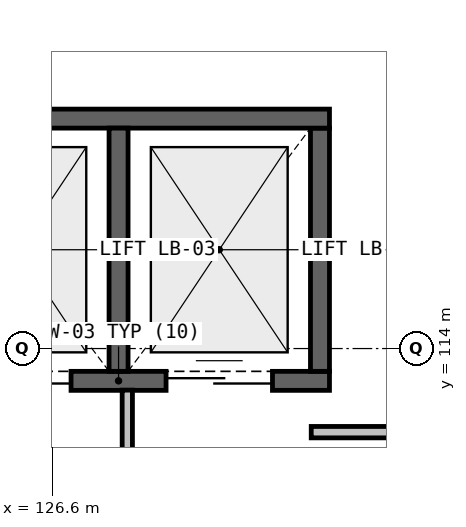
"""IFC4 building model, lengths in metres.
Left out: names, types, materials, properties, quantities, classifications, styles, units other than length and angle.
Written with IfcOpenShell. Run it as: python <this file> out.ifc"""

import sys

from ifc_helpers import new_model, si_unit, direction, frame, frame_2d, origin, place, context, subcontext, project, spatial, rectangle, extrude, element, fill, save


model = new_model("IFC4")
c1 = context("Model", 3, precision=1e-05, world=origin(), true_north=direction((0.0, 1.0)))
c2 = subcontext(c1, "Body", "Model", "MODEL_VIEW")
j1 = project(units=[si_unit("LENGTHUNIT", "METRE"), si_unit("PLANEANGLEUNIT", "RADIAN")], contexts=[c1])
p1 = place(None, origin())
s1 = spatial("IfcSite", under=j1, at=p1, CompositionType="ELEMENT")
p2 = place(p1, origin())
s2 = spatial("IfcBuilding", under=s1, at=p2, CompositionType="ELEMENT")
p3 = place(p2, frame((0.0, 0.0, 19.2)))
s3 = spatial("IfcBuildingStorey", under=s2, at=p3, CompositionType="ELEMENT", Elevation=19.2)
p4 = place(p3, frame((124.7, 113.575, 0.0), z_axis=(0.0, 0.0, 1.0), x_axis=(1.0, 0.0, 0.0)))
e1 = element("IfcWall", 1, at=p4, inside=s3, PredefinedType="SHEAR", context=c2, shape_type="SweptSolid", body=[
    extrude(rectangle(XDim=5.55, YDim=0.25, at=frame_2d((2.775, 0.0))), origin(), (0.0, 0.0, 1.0), 3.77),
])
p5 = place(p4, frame((0.75, 0.0, 0.0)))
e2 = element("IfcOpeningElement", 2, at=p5, cuts=e1, PredefinedType="OPENING", context=c2, shape_type="SweptSolid", body=[
    extrude(rectangle(XDim=1.4, YDim=2.2, at=frame_2d((0.7, 1.1))), frame((0.0, 0.135, 0.0), z_axis=(0.0, -1.0, 0.0), x_axis=(1.0, 0.0, 0.0)), (0.0, 0.0, 1.0), 0.27),
])
p6 = place(p4, frame((3.4, 0.0, 0.0)))
e3 = element("IfcOpeningElement", 3, at=p6, cuts=e1, PredefinedType="OPENING", context=c2, shape_type="SweptSolid", body=[
    extrude(rectangle(XDim=1.4, YDim=2.2, at=frame_2d((0.7, 1.1))), frame((0.0, 0.135, 0.0), z_axis=(0.0, -1.0, 0.0), x_axis=(1.0, 0.0, 0.0)), (0.0, 0.0, 1.0), 0.27),
])
p7 = place(p3, frame((130.125, 113.7, 0.0), z_axis=(0.0, 0.0, 1.0), x_axis=(0.0, 1.0, 0.0)))
e4 = element("IfcWall", 4, at=p7, inside=s3, PredefinedType="SHEAR", context=c2, shape_type="SweptSolid", body=[
    extrude(rectangle(XDim=3.2, YDim=0.25, at=frame_2d((1.6, 0.0))), origin(), (0.0, 0.0, 1.0), 3.77),
])
p8 = place(p3, frame((130.25, 117.025, 0.0), z_axis=(0.0, 0.0, 1.0), x_axis=(-1.0, 0.0, 0.0)))
e5 = element("IfcWall", 5, at=p8, inside=s3, PredefinedType="SHEAR", context=c2, shape_type="SweptSolid", body=[
    extrude(rectangle(XDim=5.55, YDim=0.25, at=frame_2d((2.775, 0.0))), origin(), (0.0, 0.0, 1.0), 3.77),
])
p9 = place(p3, frame((127.475, 113.7, 0.0), z_axis=(0.0, 0.0, 1.0), x_axis=(0.0, 1.0, 0.0)))
e6 = element("IfcWall", 6, at=p9, inside=s3, PredefinedType="SHEAR", context=c2, shape_type="SweptSolid", body=[
    extrude(rectangle(XDim=3.2, YDim=0.25, at=frame_2d((1.6, 0.0))), origin(), (0.0, 0.0, 1.0), 3.77),
])
p10 = place(p3, frame((127.59, 113.453, 0.0), z_axis=(0.0, 0.0, 1.0), x_axis=(0.0, -1.0, 0.0)))
e7 = element("IfcWall", 7, at=p10, inside=s3, PredefinedType="PARTITIONING", context=c2, shape_type="SweptSolid", body=[
    extrude(rectangle(XDim=3.553, YDim=0.135, at=frame_2d((1.776, 0.0))), origin(), (0.0, 0.0, 1.0), 3.77),
])
p11 = place(p10, frame((1.301, 0.0, 0.0)))
e8 = element("IfcOpeningElement", 8, at=p11, cuts=e7, PredefinedType="OPENING", context=c2, shape_type="SweptSolid", body=[
    extrude(rectangle(XDim=0.95, YDim=2.1, at=frame_2d((0.475, 1.05))), frame((0.0, 0.077, 0.0), z_axis=(0.0, -1.0, 0.0), x_axis=(1.0, 0.0, 0.0)), (0.0, 0.0, 1.0), 0.155),
])
p12 = place(p3, frame((131.922, 112.9, 0.0), z_axis=(0.0, 0.0, 1.0), x_axis=(-1.0, 0.0, 0.0)))
e9 = element("IfcWall", 9, at=p12, inside=s3, PredefinedType="PARTITIONING", context=c2, shape_type="SweptSolid", body=[
    extrude(rectangle(XDim=1.912, YDim=0.15, at=frame_2d((0.956, 0.0))), origin(), (0.0, 0.0, 1.0), 3.77),
])
p13 = place(p5, origin())
e10 = element("IfcDoor", 10, at=p13, inside=s3, OperationType="DOUBLE_DOOR_SLIDING", PredefinedType="DOOR", context=c2, shape_type="SweptSolid", body=[
    extrude(rectangle(XDim=1.4, YDim=2.2, at=frame_2d((0.7, 1.1))), frame((0.0, 0.025, 0.0), z_axis=(0.0, -1.0, 0.0), x_axis=(1.0, 0.0, 0.0)), (0.0, 0.0, 1.0), 0.05),
])
fill(e2, e10)
p14 = place(p6, origin())
e11 = element("IfcDoor", 11, at=p14, inside=s3, OperationType="DOUBLE_DOOR_SLIDING", PredefinedType="DOOR", context=c2, shape_type="SweptSolid", body=[
    extrude(rectangle(XDim=1.4, YDim=2.2, at=frame_2d((0.7, 1.1))), frame((0.0, 0.025, 0.0), z_axis=(0.0, -1.0, 0.0), x_axis=(1.0, 0.0, 0.0)), (0.0, 0.0, 1.0), 0.05),
])
fill(e3, e11)
save(model, sys.argv[1])
